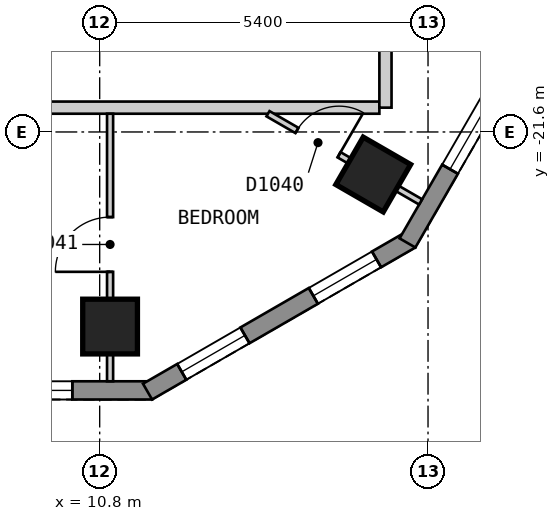
"""IFC4 building model, lengths in metres.
Left out: names, types, materials, properties, quantities, classifications, styles, units other than length and angle.
Written with IfcOpenShell. Run it as: python <this file> out.ifc"""

import sys

from ifc_helpers import new_model, si_unit, direction, frame, frame_2d, origin, origin_2d, place, context, subcontext, project, spatial, polyline, rectangle, outline, extrude, element, fill, save


model = new_model("IFC4")
c1 = context("Model", 3, precision=1e-05, world=origin(), true_north=direction((0.0, 1.0)))
c2 = subcontext(c1, "Body", "Model", "MODEL_VIEW")
j1 = project(units=[si_unit("LENGTHUNIT", "METRE"), si_unit("PLANEANGLEUNIT", "RADIAN")], contexts=[c1])
p1 = place(None, origin())
s1 = spatial("IfcSite", under=j1, at=p1, CompositionType="ELEMENT")
p2 = place(p1, origin())
s2 = spatial("IfcBuilding", under=s1, at=p2, CompositionType="ELEMENT")
p3 = place(p2, frame((0.0, 0.0, 120.6)))
s3 = spatial("IfcBuildingStorey", under=s2, at=p3, CompositionType="ELEMENT", Elevation=120.6)
for number, where, z_axis, x_axis in (
    (1, (10.971, -24.8, 0.0), (0.0, 0.0, 1.0), (1.0, 0.0, 0.0)),
    (2, (15.299, -22.3, 0.0), (0.0, 0.0, 1.0), (0.5, 0.866, 0.0)),
):
    element("IfcColumn", number, at=place(p3, frame(where, z_axis=z_axis, x_axis=x_axis)), inside=s3, PredefinedType="COLUMN", context=c2, shape_type="SweptSolid", body=[
        extrude(rectangle(XDim=0.9, YDim=0.9, at=origin_2d()), origin(), (0.0, 0.0, 1.0), 3.0),
    ])
p4 = place(p3, frame((-11.662, -25.85, 0.0), z_axis=(0.0, 0.0, 1.0), x_axis=(1.0, 0.0, 0.0)))
e3 = element("IfcWall", 3, at=p4, inside=s3, PredefinedType="SOLIDWALL", context=c2, shape_type="SweptSolid", body=[
    extrude(outline(polyline([(0.0, -0.15), (23.324, -0.15), (23.244, 0.15), (0.08, 0.15), (0.0, -0.15)])), origin(), (0.0, 0.0, 1.0), 2.7),
])
p5 = place(p4, frame((1.314, 0.0, 0.15)))
e4 = element("IfcOpeningElement", 4, at=p5, cuts=e3, PredefinedType="OPENING", context=c2, shape_type="SweptSolid", body=[
    extrude(rectangle(XDim=1.5, YDim=2.1, at=frame_2d((0.75, 1.05))), frame((0.0, 0.16, 0.0), z_axis=(0.0, -1.0, 0.0), x_axis=(1.0, 0.0, 0.0)), (0.0, 0.0, 1.0), 0.32),
])
p6 = place(p4, frame((4.057, 0.0, 0.15)))
e5 = element("IfcOpeningElement", 5, at=p6, cuts=e3, PredefinedType="OPENING", context=c2, shape_type="SweptSolid", body=[
    extrude(rectangle(XDim=1.5, YDim=2.1, at=frame_2d((0.75, 1.05))), frame((0.0, 0.16, 0.0), z_axis=(0.0, -1.0, 0.0), x_axis=(1.0, 0.0, 0.0)), (0.0, 0.0, 1.0), 0.32),
])
p7 = place(p4, frame((6.799, 0.0, 0.15)))
e6 = element("IfcOpeningElement", 6, at=p7, cuts=e3, PredefinedType="OPENING", context=c2, shape_type="SweptSolid", body=[
    extrude(rectangle(XDim=1.5, YDim=2.1, at=frame_2d((0.75, 1.05))), frame((0.0, 0.16, 0.0), z_axis=(0.0, -1.0, 0.0), x_axis=(1.0, 0.0, 0.0)), (0.0, 0.0, 1.0), 0.32),
])
p8 = place(p4, frame((9.542, 0.0, 0.15)))
e7 = element("IfcOpeningElement", 7, at=p8, cuts=e3, PredefinedType="OPENING", context=c2, shape_type="SweptSolid", body=[
    extrude(rectangle(XDim=1.5, YDim=2.1, at=frame_2d((0.75, 1.05))), frame((0.0, 0.16, 0.0), z_axis=(0.0, -1.0, 0.0), x_axis=(1.0, 0.0, 0.0)), (0.0, 0.0, 1.0), 0.32),
])
p9 = place(p4, frame((12.284, 0.0, 0.15)))
e8 = element("IfcOpeningElement", 8, at=p9, cuts=e3, PredefinedType="OPENING", context=c2, shape_type="SweptSolid", body=[
    extrude(rectangle(XDim=1.5, YDim=2.1, at=frame_2d((0.75, 1.05))), frame((0.0, 0.16, 0.0), z_axis=(0.0, -1.0, 0.0), x_axis=(1.0, 0.0, 0.0)), (0.0, 0.0, 1.0), 0.32),
])
p10 = place(p4, frame((15.027, 0.0, 0.15)))
e9 = element("IfcOpeningElement", 9, at=p10, cuts=e3, PredefinedType="OPENING", context=c2, shape_type="SweptSolid", body=[
    extrude(rectangle(XDim=1.5, YDim=2.1, at=frame_2d((0.75, 1.05))), frame((0.0, 0.16, 0.0), z_axis=(0.0, -1.0, 0.0), x_axis=(1.0, 0.0, 0.0)), (0.0, 0.0, 1.0), 0.32),
])
p11 = place(p4, frame((17.769, 0.0, 0.15)))
e10 = element("IfcOpeningElement", 10, at=p11, cuts=e3, PredefinedType="OPENING", context=c2, shape_type="SweptSolid", body=[
    extrude(rectangle(XDim=1.5, YDim=2.1, at=frame_2d((0.75, 1.05))), frame((0.0, 0.16, 0.0), z_axis=(0.0, -1.0, 0.0), x_axis=(1.0, 0.0, 0.0)), (0.0, 0.0, 1.0), 0.32),
])
p12 = place(p4, frame((20.512, 0.0, 0.15)))
e11 = element("IfcOpeningElement", 11, at=p12, cuts=e3, PredefinedType="OPENING", context=c2, shape_type="SweptSolid", body=[
    extrude(rectangle(XDim=1.5, YDim=2.1, at=frame_2d((0.75, 1.05))), frame((0.0, 0.16, 0.0), z_axis=(0.0, -1.0, 0.0), x_axis=(1.0, 0.0, 0.0)), (0.0, 0.0, 1.0), 0.32),
])
p13 = place(p3, frame((11.587, -25.87, 0.0), z_axis=(0.0, 0.0, 1.0), x_axis=(0.866022959057, 0.500004234368, 0.0)))
e12 = element("IfcWall", 12, at=p13, inside=s3, PredefinedType="SOLIDWALL", context=c2, shape_type="SweptSolid", body=[
    extrude(outline(polyline([(0.0, -0.15), (5.0, -0.15), (4.92, 0.15), (0.08, 0.15), (0.0, -0.15)])), origin(), (0.0, 0.0, 1.0), 2.7),
])
p14 = place(p13, frame((0.65, 0.0, 0.15)))
e13 = element("IfcOpeningElement", 13, at=p14, cuts=e12, PredefinedType="OPENING", context=c2, shape_type="SweptSolid", body=[
    extrude(rectangle(XDim=1.2, YDim=2.1, at=frame_2d((0.6, 1.05))), frame((0.0, 0.16, 0.0), z_axis=(0.0, -1.0, 0.0), x_axis=(1.0, 0.0, 0.0)), (0.0, 0.0, 1.0), 0.32),
])
p15 = place(p13, frame((3.149, 0.0, 0.15)))
e14 = element("IfcOpeningElement", 14, at=p15, cuts=e12, PredefinedType="OPENING", context=c2, shape_type="SweptSolid", body=[
    extrude(rectangle(XDim=1.2, YDim=2.1, at=frame_2d((0.6, 1.05))), frame((0.0, 0.16, 0.0), z_axis=(0.0, -1.0, 0.0), x_axis=(1.0, 0.0, 0.0)), (0.0, 0.0, 1.0), 0.32),
])
p16 = place(p3, frame((15.862, -23.425, 0.0), z_axis=(0.0, 0.0, 1.0), x_axis=(0.500017503135, 0.866015298109, 0.0)))
e15 = element("IfcWall", 15, at=p16, inside=s3, PredefinedType="SOLIDWALL", context=c2, shape_type="SweptSolid", body=[
    extrude(outline(polyline([(0.0, -0.15), (24.711, -0.15), (24.631, 0.15), (0.08, 0.15), (0.0, -0.15)])), origin(), (0.0, 0.0, 1.0), 2.7),
])
p17 = place(p16, frame((1.4, 0.0, 0.15)))
e16 = element("IfcOpeningElement", 16, at=p17, cuts=e15, PredefinedType="OPENING", context=c2, shape_type="SweptSolid", body=[
    extrude(rectangle(XDim=1.5, YDim=2.1, at=frame_2d((0.75, 1.05))), frame((0.0, 0.16, 0.0), z_axis=(0.0, -1.0, 0.0), x_axis=(1.0, 0.0, 0.0)), (0.0, 0.0, 1.0), 0.32),
])
p18 = place(p16, frame((4.316, 0.0, 0.15)))
e17 = element("IfcOpeningElement", 17, at=p18, cuts=e15, PredefinedType="OPENING", context=c2, shape_type="SweptSolid", body=[
    extrude(rectangle(XDim=1.5, YDim=2.1, at=frame_2d((0.75, 1.05))), frame((0.0, 0.16, 0.0), z_axis=(0.0, -1.0, 0.0), x_axis=(1.0, 0.0, 0.0)), (0.0, 0.0, 1.0), 0.32),
])
p19 = place(p16, frame((7.231, 0.0, 0.15)))
e18 = element("IfcOpeningElement", 18, at=p19, cuts=e15, PredefinedType="OPENING", context=c2, shape_type="SweptSolid", body=[
    extrude(rectangle(XDim=1.5, YDim=2.1, at=frame_2d((0.75, 1.05))), frame((0.0, 0.16, 0.0), z_axis=(0.0, -1.0, 0.0), x_axis=(1.0, 0.0, 0.0)), (0.0, 0.0, 1.0), 0.32),
])
p20 = place(p16, frame((10.147, 0.0, 0.15)))
e19 = element("IfcOpeningElement", 19, at=p20, cuts=e15, PredefinedType="OPENING", context=c2, shape_type="SweptSolid", body=[
    extrude(rectangle(XDim=1.5, YDim=2.1, at=frame_2d((0.75, 1.05))), frame((0.0, 0.16, 0.0), z_axis=(0.0, -1.0, 0.0), x_axis=(1.0, 0.0, 0.0)), (0.0, 0.0, 1.0), 0.32),
])
p21 = place(p16, frame((13.062, 0.0, 0.15)))
e20 = element("IfcOpeningElement", 20, at=p21, cuts=e15, PredefinedType="OPENING", context=c2, shape_type="SweptSolid", body=[
    extrude(rectangle(XDim=1.5, YDim=2.1, at=frame_2d((0.75, 1.05))), frame((0.0, 0.16, 0.0), z_axis=(0.0, -1.0, 0.0), x_axis=(1.0, 0.0, 0.0)), (0.0, 0.0, 1.0), 0.32),
])
p22 = place(p16, frame((15.977, 0.0, 0.15)))
e21 = element("IfcOpeningElement", 21, at=p22, cuts=e15, PredefinedType="OPENING", context=c2, shape_type="SweptSolid", body=[
    extrude(rectangle(XDim=1.5, YDim=2.1, at=frame_2d((0.75, 1.05))), frame((0.0, 0.16, 0.0), z_axis=(0.0, -1.0, 0.0), x_axis=(1.0, 0.0, 0.0)), (0.0, 0.0, 1.0), 0.32),
])
p23 = place(p16, frame((18.893, 0.0, 0.15)))
e22 = element("IfcOpeningElement", 22, at=p23, cuts=e15, PredefinedType="OPENING", context=c2, shape_type="SweptSolid", body=[
    extrude(rectangle(XDim=1.5, YDim=2.1, at=frame_2d((0.75, 1.05))), frame((0.0, 0.16, 0.0), z_axis=(0.0, -1.0, 0.0), x_axis=(1.0, 0.0, 0.0)), (0.0, 0.0, 1.0), 0.32),
])
p24 = place(p16, frame((21.809, 0.0, 0.15)))
e23 = element("IfcOpeningElement", 23, at=p24, cuts=e15, PredefinedType="OPENING", context=c2, shape_type="SweptSolid", body=[
    extrude(rectangle(XDim=1.5, YDim=2.1, at=frame_2d((0.75, 1.05))), frame((0.0, 0.16, 0.0), z_axis=(0.0, -1.0, 0.0), x_axis=(1.0, 0.0, 0.0)), (0.0, 0.0, 1.0), 0.32),
])
p25 = place(p3, frame((-15.499, -21.2, 0.0), z_axis=(0.0, 0.0, 1.0), x_axis=(1.0, 0.0, 0.0)))
e24 = element("IfcWall", 24, at=p25, inside=s3, PredefinedType="PARTITIONING", context=c2, shape_type="SweptSolid", body=[
    extrude(rectangle(XDim=30.899, YDim=0.2, at=frame_2d((15.449, 0.0))), origin(), (0.0, 0.0, 1.0), 2.7),
])
p26 = place(p25, frame((12.258, 0.0, 0.0)))
e25 = element("IfcOpeningElement", 25, at=p26, cuts=e24, PredefinedType="OPENING", context=c2, shape_type="SweptSolid", body=[
    extrude(rectangle(XDim=1.0, YDim=2.1, at=frame_2d((0.5, 1.05))), frame((0.0, 0.11, 0.0), z_axis=(0.0, -1.0, 0.0), x_axis=(1.0, 0.0, 0.0)), (0.0, 0.0, 1.0), 0.22),
])
p27 = place(p3, frame((15.5, -21.2, 0.0), z_axis=(0.0, 0.0, 1.0), x_axis=(0.0, 1.0, 0.0)))
e26 = element("IfcWall", 26, at=p27, inside=s3, PredefinedType="PARTITIONING", context=c2, shape_type="SweptSolid", body=[
    extrude(rectangle(XDim=17.648, YDim=0.2, at=frame_2d((8.824, 0.0))), origin(), (0.0, 0.0, 1.0), 2.7),
])
p28 = place(p27, frame((7.575, 0.0, 0.0)))
e27 = element("IfcOpeningElement", 27, at=p28, cuts=e26, PredefinedType="OPENING", context=c2, shape_type="SweptSolid", body=[
    extrude(rectangle(XDim=1.0, YDim=2.1, at=frame_2d((0.5, 1.05))), frame((0.0, 0.11, 0.0), z_axis=(0.0, -1.0, 0.0), x_axis=(1.0, 0.0, 0.0)), (0.0, 0.0, 1.0), 0.22),
])
p29 = place(p3, frame((13.568, -21.3, 0.0), z_axis=(0.0, 0.0, 1.0), x_axis=(0.865885342641, -0.500242514586, 0.0)))
e28 = element("IfcWall", 28, at=p29, inside=s3, PredefinedType="PARTITIONING", context=c2, shape_type="SweptSolid", body=[
    extrude(rectangle(XDim=2.898, YDim=0.1, at=frame_2d((1.449, 0.0))), origin(), (0.0, 0.0, 1.0), 2.7),
])
p30 = place(p29, frame((0.55, 0.0, 0.0)))
e29 = element("IfcOpeningElement", 29, at=p30, cuts=e28, PredefinedType="OPENING", context=c2, shape_type="SweptSolid", body=[
    extrude(rectangle(XDim=0.8, YDim=2.1, at=frame_2d((0.4, 1.05))), frame((0.0, 0.06, 0.0), z_axis=(0.0, -1.0, 0.0), x_axis=(1.0, 0.0, 0.0)), (0.0, 0.0, 1.0), 0.12),
])
p31 = place(p3, frame((10.971, -25.7, 0.0), z_axis=(0.0, 0.0, 1.0), x_axis=(0.0, 1.0, 0.0)))
e30 = element("IfcWall", 30, at=p31, inside=s3, PredefinedType="PARTITIONING", context=c2, shape_type="SweptSolid", body=[
    extrude(rectangle(XDim=4.4, YDim=0.1, at=frame_2d((2.2, 0.0))), origin(), (0.0, 0.0, 1.0), 2.7),
])
p32 = place(p31, frame((1.8, 0.0, 0.0)))
e31 = element("IfcOpeningElement", 31, at=p32, cuts=e30, PredefinedType="OPENING", context=c2, shape_type="SweptSolid", body=[
    extrude(rectangle(XDim=0.9, YDim=2.1, at=frame_2d((0.45, 1.05))), frame((0.0, 0.06, 0.0), z_axis=(0.0, -1.0, 0.0), x_axis=(1.0, 0.0, 0.0)), (0.0, 0.0, 1.0), 0.12),
])
p33 = place(p12, origin())
e32 = element("IfcWindow", 32, at=p33, inside=s3, PartitioningType="SINGLE_PANEL", PredefinedType="WINDOW", context=c2, shape_type="SweptSolid", body=[
    extrude(rectangle(XDim=1.5, YDim=2.1, at=frame_2d((0.75, 1.05))), frame((0.0, 0.03, 0.0), z_axis=(0.0, -1.0, 0.0), x_axis=(1.0, 0.0, 0.0)), (0.0, 0.0, 1.0), 0.06),
])
fill(e11, e32)
p34 = place(p14, origin())
e33 = element("IfcWindow", 33, at=p34, inside=s3, PartitioningType="SINGLE_PANEL", PredefinedType="WINDOW", context=c2, shape_type="SweptSolid", body=[
    extrude(rectangle(XDim=1.2, YDim=2.1, at=frame_2d((0.6, 1.05))), frame((0.0, 0.03, 0.0), z_axis=(0.0, -1.0, 0.0), x_axis=(1.0, 0.0, 0.0)), (0.0, 0.0, 1.0), 0.06),
])
fill(e13, e33)
p35 = place(p15, origin())
e34 = element("IfcWindow", 34, at=p35, inside=s3, PartitioningType="SINGLE_PANEL", PredefinedType="WINDOW", context=c2, shape_type="SweptSolid", body=[
    extrude(rectangle(XDim=1.2, YDim=2.1, at=frame_2d((0.6, 1.05))), frame((0.0, 0.03, 0.0), z_axis=(0.0, -1.0, 0.0), x_axis=(1.0, 0.0, 0.0)), (0.0, 0.0, 1.0), 0.06),
])
fill(e14, e34)
p36 = place(p17, origin())
e35 = element("IfcWindow", 35, at=p36, inside=s3, PartitioningType="SINGLE_PANEL", PredefinedType="WINDOW", context=c2, shape_type="SweptSolid", body=[
    extrude(rectangle(XDim=1.5, YDim=2.1, at=frame_2d((0.75, 1.05))), frame((0.0, 0.03, 0.0), z_axis=(0.0, -1.0, 0.0), x_axis=(1.0, 0.0, 0.0)), (0.0, 0.0, 1.0), 0.06),
])
fill(e16, e35)
p37 = place(p30, origin())
e36 = element("IfcDoor", 36, at=p37, inside=s3, OperationType="SINGLE_SWING_RIGHT", PredefinedType="DOOR", context=c2, shape_type="SweptSolid", body=[
    extrude(rectangle(XDim=0.8, YDim=2.1, at=frame_2d((0.4, 1.05))), frame((0.0, 0.025, 0.0), z_axis=(0.0, -1.0, 0.0), x_axis=(1.0, 0.0, 0.0)), (0.0, 0.0, 1.0), 0.05),
])
fill(e29, e36)
p38 = place(p32, origin())
e37 = element("IfcDoor", 37, at=p38, inside=s3, OperationType="SINGLE_SWING_LEFT", PredefinedType="DOOR", context=c2, shape_type="SweptSolid", body=[
    extrude(rectangle(XDim=0.9, YDim=2.1, at=frame_2d((0.45, 1.05))), frame((0.0, 0.025, 0.0), z_axis=(0.0, -1.0, 0.0), x_axis=(1.0, 0.0, 0.0)), (0.0, 0.0, 1.0), 0.05),
])
fill(e31, e37)
save(model, sys.argv[1])
